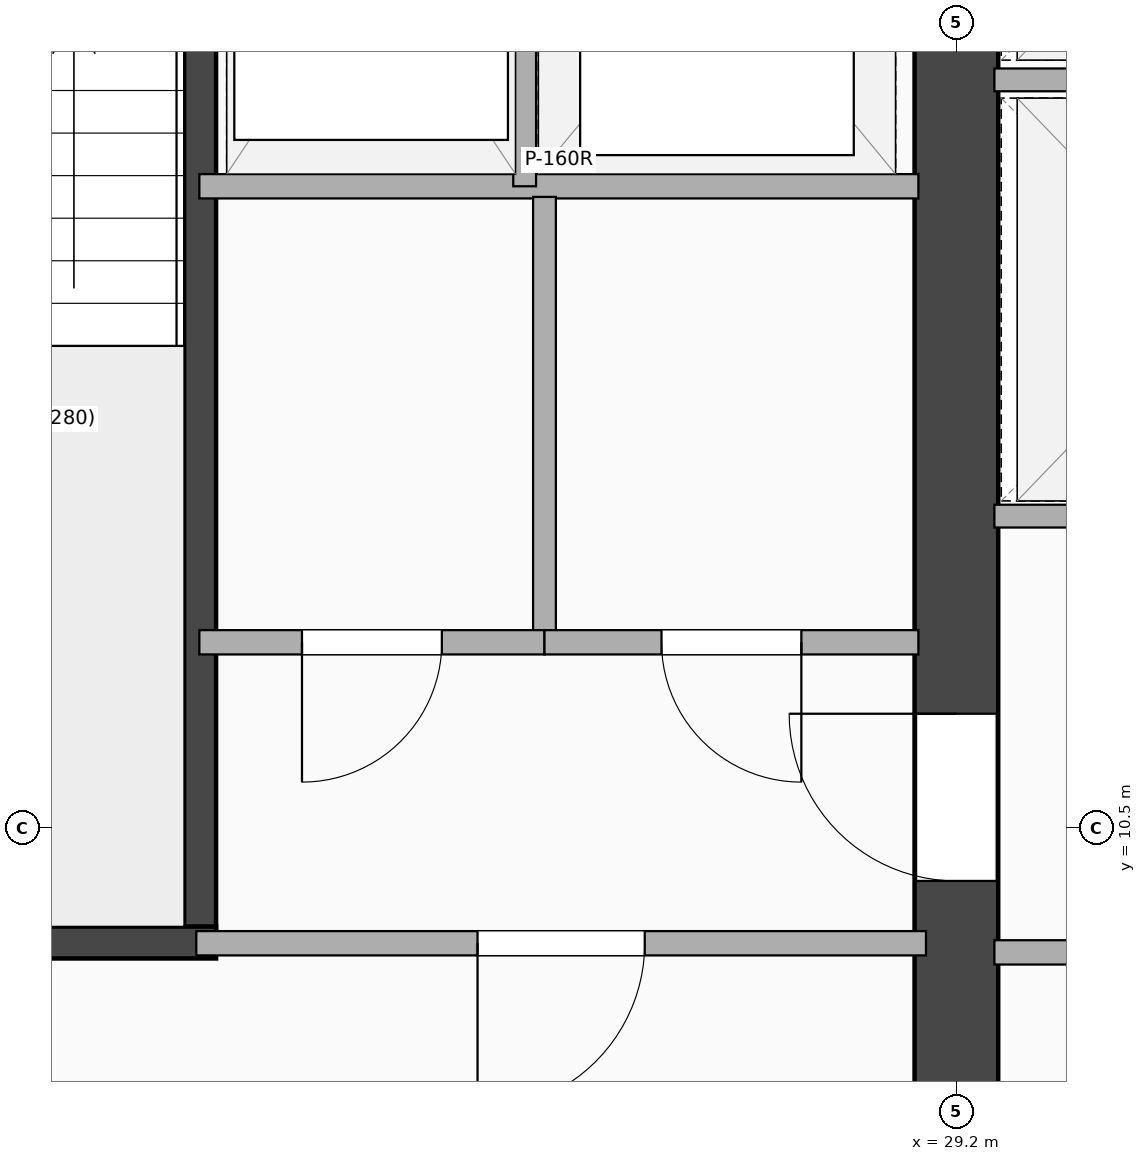
"""IFC4 building model, lengths in metres.
Left out: names, types, materials, properties, quantities, classifications, styles, units other than length and angle.
Written with IfcOpenShell. Run it as: python <this file> out.ifc"""

import sys

from ifc_helpers import new_model, si_unit, direction, frame, frame_2d, origin, place, context, subcontext, project, spatial, rectangle, extrude, element, fill, save


model = new_model("IFC4")
c1 = context("Model", 3, precision=1e-05, world=origin(), true_north=direction((0.0, 1.0)))
c2 = subcontext(c1, "Body", "Model", "MODEL_VIEW")
j1 = project(units=[si_unit("LENGTHUNIT", "METRE"), si_unit("PLANEANGLEUNIT", "RADIAN")], contexts=[c1])
p1 = place(None, origin())
s1 = spatial("IfcSite", under=j1, at=p1, CompositionType="ELEMENT")
p2 = place(p1, origin())
s2 = spatial("IfcBuilding", under=s1, at=p2, CompositionType="ELEMENT")
p3 = place(p2, frame((0.0, 0.0, 112.7)))
s3 = spatial("IfcBuildingStorey", under=s2, at=p3, CompositionType="ELEMENT", Elevation=112.7)
p4 = place(p3, frame((29.2, 3.5, 0.0), z_axis=(0.0, 0.0, 1.0), x_axis=(0.0, 1.0, 0.0)))
e1 = element("IfcWall", 1, at=p4, inside=s3, PredefinedType="SHEAR", context=c2, shape_type="SweptSolid", body=[
    extrude(rectangle(XDim=16.9, YDim=0.55, at=frame_2d((8.45, 0.0))), origin(), (0.0, 0.0, 1.0), 3.24),
])
p5 = place(p4, frame((7.75, 0.0, 0.0), z_axis=(0.0, 0.0, 1.0), x_axis=(-1.0, 0.0, 0.0)))
e2 = element("IfcOpeningElement", 2, at=p5, cuts=e1, PredefinedType="OPENING", context=c2, shape_type="SweptSolid", body=[
    extrude(rectangle(XDim=1.1, YDim=2.15, at=frame_2d((0.55, 1.075))), frame((0.0, 0.285, 0.0), z_axis=(0.0, -1.0, 0.0), x_axis=(1.0, 0.0, 0.0)), (0.0, 0.0, 1.0), 0.57),
])
p6 = place(p3, frame((24.225, 9.745, 0.0), z_axis=(0.0, 0.0, 1.0), x_axis=(0.0, 1.0, 0.0)))
e3 = element("IfcWall", 3, at=p6, inside=s3, PredefinedType="SHEAR", context=c2, shape_type="SweptSolid", body=[
    extrude(rectangle(XDim=8.01, YDim=0.21, at=frame_2d((4.005, 0.0))), origin(), (0.0, 0.0, 1.0), 3.24),
])
p7 = place(p3, frame((20.67, 9.745, 0.0), z_axis=(0.0, 0.0, 1.0), x_axis=(1.0, 0.0, 0.0)))
e4 = element("IfcWall", 4, at=p7, inside=s3, PredefinedType="SHEAR", context=c2, shape_type="SweptSolid", body=[
    extrude(rectangle(XDim=3.66, YDim=0.21, at=frame_2d((1.83, 0.0))), origin(), (0.0, 0.0, 1.0), 3.24),
])
p8 = place(p3, frame((24.22, 14.72, 0.0), z_axis=(0.0, 0.0, 1.0), x_axis=(1.0, 0.0, 0.0)))
e5 = element("IfcWall", 5, at=p8, inside=s3, PredefinedType="PARTITIONING", context=c2, shape_type="SweptSolid", body=[
    extrude(rectangle(XDim=4.73, YDim=0.16, at=frame_2d((2.365, 0.0))), origin(), (0.0, 0.0, 1.0), 3.24),
])
p9 = place(p3, frame((26.36, 14.72, 0.0), z_axis=(0.0, 0.0, 1.0), x_axis=(0.0, 1.0, 0.0)))
e6 = element("IfcWall", 6, at=p9, inside=s3, PredefinedType="PARTITIONING", context=c2, shape_type="SweptSolid", body=[
    extrude(rectangle(XDim=3.04, YDim=0.15, at=frame_2d((1.52, 0.0))), origin(), (0.0, 0.0, 1.0), 3.24),
])
p10 = place(p3, frame((26.49, 11.72, 0.0), z_axis=(0.0, 0.0, 1.0), x_axis=(0.0, 1.0, 0.0)))
e7 = element("IfcWall", 7, at=p10, inside=s3, PredefinedType="PARTITIONING", context=c2, shape_type="SweptSolid", body=[
    extrude(rectangle(XDim=2.93, YDim=0.15, at=frame_2d((1.465, 0.0))), origin(), (0.0, 0.0, 1.0), 3.24),
])
p11 = place(p3, frame((24.22, 11.72, 0.0), z_axis=(0.0, 0.0, 1.0), x_axis=(1.0, 0.0, 0.0)))
e8 = element("IfcWall", 8, at=p11, inside=s3, PredefinedType="PARTITIONING", context=c2, shape_type="SweptSolid", body=[
    extrude(rectangle(XDim=2.271, YDim=0.16, at=frame_2d((1.135, 0.0))), origin(), (0.0, 0.0, 1.0), 3.24),
])
p12 = place(p11, frame((0.675, 0.0, 0.0)))
e9 = element("IfcOpeningElement", 9, at=p12, cuts=e8, PredefinedType="OPENING", context=c2, shape_type="SweptSolid", body=[
    extrude(rectangle(XDim=0.92, YDim=2.08, at=frame_2d((0.46, 1.04))), frame((0.0, 0.09, 0.0), z_axis=(0.0, -1.0, 0.0), x_axis=(1.0, 0.0, 0.0)), (0.0, 0.0, 1.0), 0.18),
])
p13 = place(p3, frame((26.49, 11.72, 0.0), z_axis=(0.0, 0.0, 1.0), x_axis=(1.0, 0.0, 0.0)))
e10 = element("IfcWall", 10, at=p13, inside=s3, PredefinedType="PARTITIONING", context=c2, shape_type="SweptSolid", body=[
    extrude(rectangle(XDim=2.459, YDim=0.16, at=frame_2d((1.23, 0.0))), origin(), (0.0, 0.0, 1.0), 3.24),
])
p14 = place(p13, frame((0.77, 0.0, 0.0)))
e11 = element("IfcOpeningElement", 11, at=p14, cuts=e10, PredefinedType="OPENING", context=c2, shape_type="SweptSolid", body=[
    extrude(rectangle(XDim=0.92, YDim=2.08, at=frame_2d((0.46, 1.04))), frame((0.0, 0.09, 0.0), z_axis=(0.0, -1.0, 0.0), x_axis=(1.0, 0.0, 0.0)), (0.0, 0.0, 1.0), 0.18),
])
p15 = place(p3, frame((24.2, 9.74, 0.0), z_axis=(0.0, 0.0, 1.0), x_axis=(1.0, 0.0, 0.0)))
e12 = element("IfcWall", 12, at=p15, inside=s3, PredefinedType="PARTITIONING", context=c2, shape_type="SweptSolid", body=[
    extrude(rectangle(XDim=4.8, YDim=0.16, at=frame_2d((2.4, 0.0))), origin(), (0.0, 0.0, 1.0), 3.24),
])
p16 = place(p15, frame((1.85, 0.0, 0.0)))
e13 = element("IfcOpeningElement", 13, at=p16, cuts=e12, PredefinedType="OPENING", context=c2, shape_type="SweptSolid", body=[
    extrude(rectangle(XDim=1.1, YDim=2.15, at=frame_2d((0.55, 1.075))), frame((0.0, 0.09, 0.0), z_axis=(0.0, -1.0, 0.0), x_axis=(1.0, 0.0, 0.0)), (0.0, 0.0, 1.0), 0.18),
])
p17 = place(p3, frame((29.45, 9.68, 0.0), z_axis=(0.0, 0.0, 1.0), x_axis=(1.0, 0.0, 0.0)))
e14 = element("IfcWall", 14, at=p17, inside=s3, PredefinedType="PARTITIONING", context=c2, shape_type="SweptSolid", body=[
    extrude(rectangle(XDim=3.504, YDim=0.16, at=frame_2d((1.752, 0.0))), origin(), (0.0, 0.0, 1.0), 3.24),
])
p18 = place(p17, frame((2.212, 0.0, 0.0), z_axis=(0.0, 0.0, 1.0), x_axis=(-1.0, 0.0, 0.0)))
e15 = element("IfcOpeningElement", 15, at=p18, cuts=e14, PredefinedType="OPENING", context=c2, shape_type="SweptSolid", body=[
    extrude(rectangle(XDim=0.92, YDim=2.08, at=frame_2d((0.46, 1.04))), frame((0.0, 0.09, 0.0), z_axis=(0.0, -1.0, 0.0), x_axis=(1.0, 0.0, 0.0)), (0.0, 0.0, 1.0), 0.18),
])
for number, where, z_axis, x_axis in (
    (16, (29.45, 12.55, 0.0), (0.0, 0.0, 1.0), (1.0, 0.0, 0.0)),
    (17, (29.45, 15.42, 0.0), (0.0, 0.0, 1.0), (1.0, 0.0, 0.0)),
):
    element("IfcWall", number, at=place(p3, frame(where, z_axis=z_axis, x_axis=x_axis)), inside=s3, PredefinedType="PARTITIONING", context=c2, shape_type="SweptSolid", body=[
        extrude(rectangle(XDim=2.77, YDim=0.15, at=frame_2d((1.385, 0.0))), origin(), (0.0, 0.0, 1.0), 3.24),
    ])
p19 = place(p5, origin())
e18 = element("IfcDoor", 18, at=p19, inside=s3, OperationType="SINGLE_SWING_RIGHT", PredefinedType="DOOR", context=c2, shape_type="SweptSolid", body=[
    extrude(rectangle(XDim=1.1, YDim=2.15, at=frame_2d((0.55, 1.075))), frame((0.0, 0.025, 0.0), z_axis=(0.0, -1.0, 0.0), x_axis=(1.0, 0.0, 0.0)), (0.0, 0.0, 1.0), 0.05),
])
fill(e2, e18)
p20 = place(p12, origin())
e19 = element("IfcDoor", 19, at=p20, inside=s3, OperationType="SINGLE_SWING_LEFT", PredefinedType="DOOR", context=c2, shape_type="SweptSolid", body=[
    extrude(rectangle(XDim=0.92, YDim=2.08, at=frame_2d((0.46, 1.04))), frame((0.0, 0.025, 0.0), z_axis=(0.0, -1.0, 0.0), x_axis=(1.0, 0.0, 0.0)), (0.0, 0.0, 1.0), 0.05),
])
fill(e9, e19)
p21 = place(p14, origin())
e20 = element("IfcDoor", 20, at=p21, inside=s3, OperationType="SINGLE_SWING_RIGHT", PredefinedType="DOOR", context=c2, shape_type="SweptSolid", body=[
    extrude(rectangle(XDim=0.92, YDim=2.08, at=frame_2d((0.46, 1.04))), frame((0.0, 0.025, 0.0), z_axis=(0.0, -1.0, 0.0), x_axis=(1.0, 0.0, 0.0)), (0.0, 0.0, 1.0), 0.05),
])
fill(e11, e20)
p22 = place(p16, origin())
e21 = element("IfcDoor", 21, at=p22, inside=s3, OperationType="SINGLE_SWING_LEFT", PredefinedType="DOOR", context=c2, shape_type="SweptSolid", body=[
    extrude(rectangle(XDim=1.1, YDim=2.15, at=frame_2d((0.55, 1.075))), frame((0.0, 0.025, 0.0), z_axis=(0.0, -1.0, 0.0), x_axis=(1.0, 0.0, 0.0)), (0.0, 0.0, 1.0), 0.05),
])
fill(e13, e21)
save(model, sys.argv[1])
